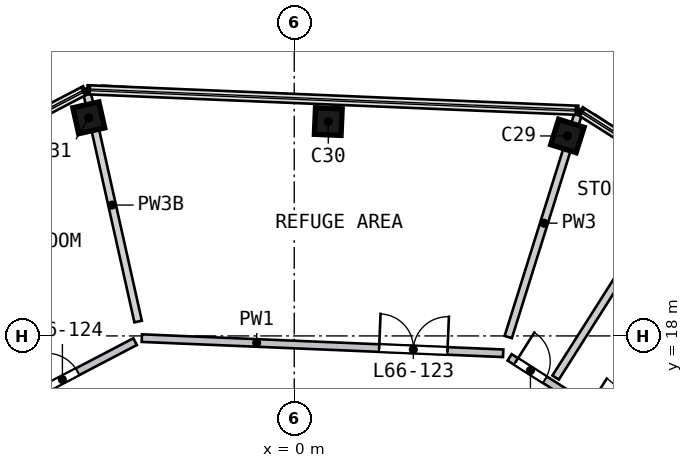
"""IFC4 building model, lengths in metres.
Left out: names, types, materials, properties, quantities, classifications, styles, units other than length and angle.
Written with IfcOpenShell. Run it as: python <this file> out.ifc"""

import sys

from ifc_helpers import new_model, si_unit, direction, frame, frame_2d, origin, origin_2d, place, context, subcontext, project, spatial, rectangle, extrude, element, fill, save


model = new_model("IFC4")
c1 = context("Model", 3, precision=1e-05, world=origin(), true_north=direction((0.0, 1.0)))
c2 = subcontext(c1, "Body", "Model", "MODEL_VIEW")
j1 = project(units=[si_unit("LENGTHUNIT", "METRE"), si_unit("PLANEANGLEUNIT", "RADIAN")], contexts=[c1])
p1 = place(None, origin())
s1 = spatial("IfcSite", under=j1, at=p1, CompositionType="ELEMENT")
p2 = place(p1, origin())
s2 = spatial("IfcBuilding", under=s1, at=p2, CompositionType="ELEMENT")
p3 = place(p2, frame((0.0, 0.0, 269.0)))
s3 = spatial("IfcBuildingStorey", under=s2, at=p3, CompositionType="ELEMENT", Elevation=269.0)
p4 = place(p3, frame((7.281, 23.234, 0.0), z_axis=(-0.077825577, 0.023658975, 0.996686226), x_axis=(0.951117562, -0.297924961, 0.081339413)))
e1 = element("IfcColumn", 1, at=p4, inside=s3, PredefinedType="COLUMN", context=c2, shape_type="SweptSolid", body=[
    extrude(rectangle(XDim=0.7, YDim=0.7, at=origin_2d()), origin(), (0.0, 0.0, 1.0), 4.706),
])
p5 = place(p3, frame((0.991, 23.638, 0.0), z_axis=(-0.078981792, 0.002594671, 0.996872682), x_axis=(-0.996024088, 0.041129091, -0.079021609)))
e2 = element("IfcColumn", 2, at=p5, inside=s3, PredefinedType="COLUMN", context=c2, shape_type="SweptSolid", body=[
    extrude(rectangle(XDim=0.7, YDim=0.7, at=origin_2d()), origin(), (0.0, 0.0, 1.0), 4.705),
])
p6 = place(p3, frame((-5.311, 23.762, 0.0), z_axis=(-0.079226457, -0.018418724, 0.99668647), x_axis=(0.972665981, 0.217497759, 0.081336422)))
e3 = element("IfcColumn", 3, at=p6, inside=s3, PredefinedType="COLUMN", context=c2, shape_type="SweptSolid", body=[
    extrude(rectangle(XDim=0.7, YDim=0.7, at=origin_2d()), origin(), (0.0, 0.0, 1.0), 4.706),
])
p7 = place(p3, frame((-12.267, 13.625, 0.0), z_axis=(0.0, 0.0, 1.0), x_axis=(0.886199207, 0.463304399, 0.0)))
e4 = element("IfcWall", 4, at=p7, inside=s3, PredefinedType="SOLIDWALL", context=c2, shape_type="SweptSolid", body=[
    extrude(rectangle(XDim=9.117, YDim=0.2, at=frame_2d((4.559, 0.0))), origin(), (0.0, 0.0, 1.0), 4.69),
])
p8 = place(p7, frame((6.508, 0.0, 0.0)))
e5 = element("IfcOpeningElement", 5, at=p8, cuts=e4, PredefinedType="OPENING", context=c2, shape_type="SweptSolid", body=[
    extrude(rectangle(XDim=0.9, YDim=2.1, at=frame_2d((0.45, 1.05))), frame((0.0, 0.11, 0.0), z_axis=(0.0, -1.0, 0.0), x_axis=(1.0, 0.0, 0.0)), (0.0, 0.0, 1.0), 0.22),
])
p9 = place(p7, frame((2.458, 0.0, 0.0)))
e6 = element("IfcOpeningElement", 6, at=p9, cuts=e4, PredefinedType="OPENING", context=c2, shape_type="SweptSolid", body=[
    extrude(rectangle(XDim=0.9, YDim=2.1, at=frame_2d((0.45, 1.05))), frame((0.0, 0.11, 0.0), z_axis=(0.0, -1.0, 0.0), x_axis=(1.0, 0.0, 0.0)), (0.0, 0.0, 1.0), 0.22),
])
p10 = place(p7, frame((0.2, 0.0, 0.0)))
e7 = element("IfcOpeningElement", 7, at=p10, cuts=e4, PredefinedType="OPENING", context=c2, shape_type="SweptSolid", body=[
    extrude(rectangle(XDim=0.9, YDim=2.1, at=frame_2d((0.45, 1.05))), frame((0.0, 0.11, 0.0), z_axis=(0.0, -1.0, 0.0), x_axis=(1.0, 0.0, 0.0)), (0.0, 0.0, 1.0), 0.22),
])
p11 = place(p3, frame((-4.01, 17.942, 0.0), z_axis=(0.0, 0.0, 1.0), x_axis=(0.999123175, -0.041867432, 0.0)))
e8 = element("IfcWall", 8, at=p11, inside=s3, PredefinedType="SOLIDWALL", context=c2, shape_type="SweptSolid", body=[
    extrude(rectangle(XDim=9.517, YDim=0.2, at=frame_2d((4.758, 0.0))), origin(), (0.0, 0.0, 1.0), 4.69),
])
p12 = place(p11, frame((6.25, 0.0, 0.0)))
e9 = element("IfcOpeningElement", 9, at=p12, cuts=e8, PredefinedType="OPENING", context=c2, shape_type="SweptSolid", body=[
    extrude(rectangle(XDim=1.8, YDim=2.1, at=frame_2d((0.9, 1.05))), frame((0.0, 0.11, 0.0), z_axis=(0.0, -1.0, 0.0), x_axis=(1.0, 0.0, 0.0)), (0.0, 0.0, 1.0), 0.22),
])
p13 = place(p3, frame((5.667, 17.436, 0.0), z_axis=(0.0, 0.0, 1.0), x_axis=(0.844321212, -0.535837373, 0.0)))
e10 = element("IfcWall", 10, at=p13, inside=s3, PredefinedType="SOLIDWALL", context=c2, shape_type="SweptSolid", body=[
    extrude(rectangle(XDim=9.317, YDim=0.2, at=frame_2d((4.658, 0.0))), origin(), (0.0, 0.0, 1.0), 4.69),
])
p14 = place(p13, frame((6.058, 0.0, 0.0)))
e11 = element("IfcOpeningElement", 11, at=p14, cuts=e10, PredefinedType="OPENING", context=c2, shape_type="SweptSolid", body=[
    extrude(rectangle(XDim=1.8, YDim=2.1, at=frame_2d((0.9, 1.05))), frame((0.0, 0.11, 0.0), z_axis=(0.0, -1.0, 0.0), x_axis=(1.0, 0.0, 0.0)), (0.0, 0.0, 1.0), 0.22),
])
p15 = place(p13, frame((2.458, 0.0, 0.0)))
e12 = element("IfcOpeningElement", 12, at=p15, cuts=e10, PredefinedType="OPENING", context=c2, shape_type="SweptSolid", body=[
    extrude(rectangle(XDim=0.9, YDim=2.1, at=frame_2d((0.45, 1.05))), frame((0.0, 0.11, 0.0), z_axis=(0.0, -1.0, 0.0), x_axis=(1.0, 0.0, 0.0)), (0.0, 0.0, 1.0), 0.22),
])
p16 = place(p13, frame((0.2, 0.0, 0.0)))
e13 = element("IfcOpeningElement", 13, at=p16, cuts=e10, PredefinedType="OPENING", context=c2, shape_type="SweptSolid", body=[
    extrude(rectangle(XDim=0.9, YDim=2.1, at=frame_2d((0.45, 1.05))), frame((0.0, 0.11, 0.0), z_axis=(0.0, -1.0, 0.0), x_axis=(1.0, 0.0, 0.0)), (0.0, 0.0, 1.0), 0.22),
])
p17 = place(p3, frame((-4.108, 18.378, 0.0), z_axis=(0.0, 0.0, 1.0), x_axis=(-0.218135948, 0.975918392, 0.0)))
e14 = element("IfcWall", 14, at=p17, inside=s3, PredefinedType="SOLIDWALL", context=c2, shape_type="SweptSolid", body=[
    extrude(rectangle(XDim=6.282, YDim=0.2, at=frame_2d((3.141, 0.0))), origin(), (0.0, 0.0, 1.0), 4.19),
])
p18 = place(p3, frame((7.51, 23.965, 0.0), z_axis=(0.0, 0.0, 1.0), x_axis=(-0.299013997, -0.954248725, 0.0)))
e15 = element("IfcWall", 15, at=p18, inside=s3, PredefinedType="SOLIDWALL", context=c2, shape_type="SweptSolid", body=[
    extrude(rectangle(XDim=6.282, YDim=0.2, at=frame_2d((3.141, 0.0))), origin(), (0.0, 0.0, 1.0), 4.69),
])
p19 = place(p3, frame((6.878, 16.904, 0.0), z_axis=(0.0, 0.0, 1.0), x_axis=(0.535841972, 0.844318294, 0.0)))
e16 = element("IfcWall", 16, at=p19, inside=s3, PredefinedType="SOLIDWALL", context=c2, shape_type="SweptSolid", body=[
    extrude(rectangle(XDim=6.3, YDim=0.2, at=frame_2d((3.15, 0.0))), origin(), (0.0, 0.0, 1.0), 4.69),
])
p20 = place(p12, origin())
e17 = element("IfcDoor", 17, at=p20, inside=s3, OperationType="DOUBLE_DOOR_SINGLE_SWING", PredefinedType="DOOR", context=c2, shape_type="SweptSolid", body=[
    extrude(rectangle(XDim=1.8, YDim=2.1, at=frame_2d((0.9, 1.05))), frame((0.0, 0.025, 0.0), z_axis=(0.0, -1.0, 0.0), x_axis=(1.0, 0.0, 0.0)), (0.0, 0.0, 1.0), 0.05),
])
fill(e9, e17)
p21 = place(p8, origin())
e18 = element("IfcDoor", 18, at=p21, inside=s3, OperationType="SINGLE_SWING_LEFT", PredefinedType="DOOR", context=c2, shape_type="SweptSolid", body=[
    extrude(rectangle(XDim=0.9, YDim=2.1, at=frame_2d((0.45, 1.05))), frame((0.0, 0.025, 0.0), z_axis=(0.0, -1.0, 0.0), x_axis=(1.0, 0.0, 0.0)), (0.0, 0.0, 1.0), 0.05),
])
fill(e5, e18)
p22 = place(p16, origin())
e19 = element("IfcDoor", 19, at=p22, inside=s3, OperationType="SINGLE_SWING_LEFT", PredefinedType="DOOR", context=c2, shape_type="SweptSolid", body=[
    extrude(rectangle(XDim=0.9, YDim=2.1, at=frame_2d((0.45, 1.05))), frame((0.0, 0.025, 0.0), z_axis=(0.0, -1.0, 0.0), x_axis=(1.0, 0.0, 0.0)), (0.0, 0.0, 1.0), 0.05),
])
fill(e13, e19)
save(model, sys.argv[1])
